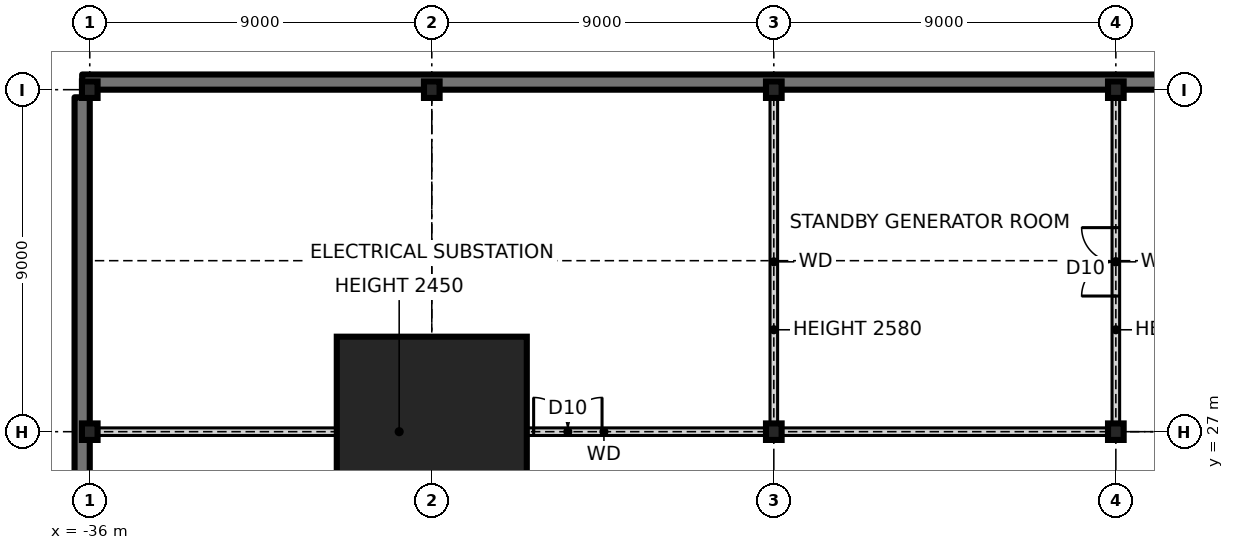
"""IFC4 building model, lengths in metres.
Left out: names, types, materials, properties, quantities, classifications, styles, units other than length and angle.
Written with IfcOpenShell. Run it as: python <this file> out.ifc"""

import sys

from ifc_helpers import new_model, si_unit, direction, frame, frame_2d, origin, origin_2d, place, context, subcontext, project, spatial, rectangle, i_section, extrude, element, fill, save


model = new_model("IFC4")
c1 = context("Model", 3, precision=1e-05, world=origin(), true_north=direction((0.0, 1.0)))
c2 = subcontext(c1, "Body", "Model", "MODEL_VIEW")
j1 = project(units=[si_unit("LENGTHUNIT", "METRE"), si_unit("PLANEANGLEUNIT", "RADIAN")], contexts=[c1])
p1 = place(None, origin())
s1 = spatial("IfcSite", under=j1, at=p1, CompositionType="ELEMENT")
p2 = place(p1, origin())
s2 = spatial("IfcBuilding", under=s1, at=p2, CompositionType="ELEMENT")
p3 = place(p2, frame((0.0, 0.0, -3.6)))
s3 = spatial("IfcBuildingStorey", under=s2, at=p3, CompositionType="ELEMENT", Elevation=-3.6)
p4 = place(p3, frame((-27.0, 27.0, 0.0), z_axis=(0.0, 0.0, 1.0), x_axis=(1.0, 0.0, 0.0)))
e1 = element("IfcColumn", 1, at=p4, inside=s3, PredefinedType="COLUMN", context=c2, shape_type="SweptSolid", body=[
    extrude(rectangle(XDim=5.0, YDim=5.0, at=origin_2d()), origin(), (0.0, 0.0, 1.0), 3.6),
    extrude(i_section(OverallWidth=0.478, OverallDepth=0.599, WebThickness=0.1, FlangeThickness=0.14, at=origin_2d()), origin(), (0.0, 0.0, 1.0), 3.6),
])
for number, where, z_axis, x_axis in (
    (2, (-36.0, 27.0, 0.0), (0.0, 0.0, 1.0), (1.0, 0.0, 0.0)),
    (3, (-36.0, 36.0, 0.0), (0.0, 0.0, 1.0), (1.0, 0.0, 0.0)),
    (4, (-27.0, 36.0, 0.0), (0.0, 0.0, 1.0), (1.0, 0.0, 0.0)),
    (5, (-18.0, 27.0, 0.0), (0.0, 0.0, 1.0), (1.0, 0.0, 0.0)),
    (6, (-18.0, 36.0, 0.0), (0.0, 0.0, 1.0), (1.0, 0.0, 0.0)),
    (7, (-9.0, 27.0, 0.0), (0.0, 0.0, 1.0), (1.0, 0.0, 0.0)),
    (8, (-9.0, 36.0, 0.0), (0.0, 0.0, 1.0), (1.0, 0.0, 0.0)),
):
    element("IfcColumn", number, at=place(p3, frame(where, z_axis=z_axis, x_axis=x_axis)), inside=s3, PredefinedType="COLUMN", context=c2, shape_type="SweptSolid", body=[
        extrude(i_section(OverallWidth=0.411, OverallDepth=0.434, WebThickness=0.036, FlangeThickness=0.057, at=origin_2d()), origin(), (0.0, 0.0, 1.0), 3.6),
    ])
p5 = place(p3, frame((90.2, 36.2, 0.0), z_axis=(0.0, 0.0, 1.0), x_axis=(-1.0, 0.0, 0.0)))
e9 = element("IfcWall", 9, at=p5, inside=s3, PredefinedType="SOLIDWALL", context=c2, shape_type="SweptSolid", body=[
    extrude(rectangle(XDim=126.4, YDim=0.4, at=frame_2d((63.2, 0.0))), origin(), (0.0, 0.0, 1.0), 2.581),
])
p6 = place(p3, frame((-36.2, 35.8, 0.0), z_axis=(0.0, 0.0, 1.0), x_axis=(0.0, -1.0, 0.0)))
e10 = element("IfcWall", 10, at=p6, inside=s3, PredefinedType="SOLIDWALL", context=c2, shape_type="SweptSolid", body=[
    extrude(rectangle(XDim=71.6, YDim=0.4, at=frame_2d((35.8, 0.0))), origin(), (0.0, 0.0, 1.0), 2.581),
])
p7 = place(p3, frame((-35.94, 27.0, 0.0), z_axis=(0.0, 0.0, 1.0), x_axis=(1.0, 0.0, 0.0)))
e11 = element("IfcWall", 11, at=p7, inside=s3, PredefinedType="SOLIDWALL", context=c2, shape_type="SweptSolid", body=[
    extrude(rectangle(XDim=26.94, YDim=0.2, at=frame_2d((13.47, 0.0))), origin(), (0.0, 0.0, 1.0), 2.45),
])
p8 = place(p7, frame((11.62, 0.0, 0.0)))
e12 = element("IfcOpeningElement", 12, at=p8, cuts=e11, PredefinedType="OPENING", context=c2, shape_type="SweptSolid", body=[
    extrude(rectangle(XDim=1.8, YDim=2.4, at=frame_2d((0.9, 1.2))), frame((0.0, 0.11, 0.0), z_axis=(0.0, -1.0, 0.0), x_axis=(1.0, 0.0, 0.0)), (0.0, 0.0, 1.0), 0.22),
])
p9 = place(p3, frame((-9.0, 27.0, 0.0), z_axis=(0.0, 0.0, 1.0), x_axis=(0.0, 1.0, 0.0)))
e13 = element("IfcWall", 13, at=p9, inside=s3, PredefinedType="SOLIDWALL", context=c2, shape_type="SweptSolid", body=[
    extrude(rectangle(XDim=8.94, YDim=0.2, at=frame_2d((4.47, 0.0))), origin(), (0.0, 0.0, 1.0), 2.581),
])
p10 = place(p9, frame((3.57, 0.0, 0.0)))
e14 = element("IfcOpeningElement", 14, at=p10, cuts=e13, PredefinedType="OPENING", context=c2, shape_type="SweptSolid", body=[
    extrude(rectangle(XDim=1.8, YDim=2.4, at=frame_2d((0.9, 1.2))), frame((0.0, 0.11, 0.0), z_axis=(0.0, -1.0, 0.0), x_axis=(1.0, 0.0, 0.0)), (0.0, 0.0, 1.0), 0.22),
])
p11 = place(p3, frame((-18.0, 27.0, 0.0), z_axis=(0.0, 0.0, 1.0), x_axis=(0.0, 1.0, 0.0)))
e15 = element("IfcWall", 15, at=p11, inside=s3, PredefinedType="SOLIDWALL", context=c2, shape_type="SweptSolid", body=[
    extrude(rectangle(XDim=8.94, YDim=0.2, at=frame_2d((4.47, 0.0))), origin(), (0.0, 0.0, 1.0), 2.581),
])
p12 = place(p8, origin())
e16 = element("IfcDoor", 16, at=p12, inside=s3, OperationType="DOUBLE_DOOR_SINGLE_SWING", PredefinedType="DOOR", context=c2, shape_type="SweptSolid", body=[
    extrude(rectangle(XDim=1.8, YDim=2.4, at=frame_2d((0.9, 1.2))), frame((0.0, 0.025, 0.0), z_axis=(0.0, -1.0, 0.0), x_axis=(1.0, 0.0, 0.0)), (0.0, 0.0, 1.0), 0.05),
])
fill(e12, e16)
p13 = place(p10, origin())
e17 = element("IfcDoor", 17, at=p13, inside=s3, OperationType="DOUBLE_DOOR_SINGLE_SWING", PredefinedType="DOOR", context=c2, shape_type="SweptSolid", body=[
    extrude(rectangle(XDim=1.8, YDim=2.4, at=frame_2d((0.9, 1.2))), frame((0.0, 0.025, 0.0), z_axis=(0.0, -1.0, 0.0), x_axis=(1.0, 0.0, 0.0)), (0.0, 0.0, 1.0), 0.05),
])
fill(e14, e17)
save(model, sys.argv[1])
